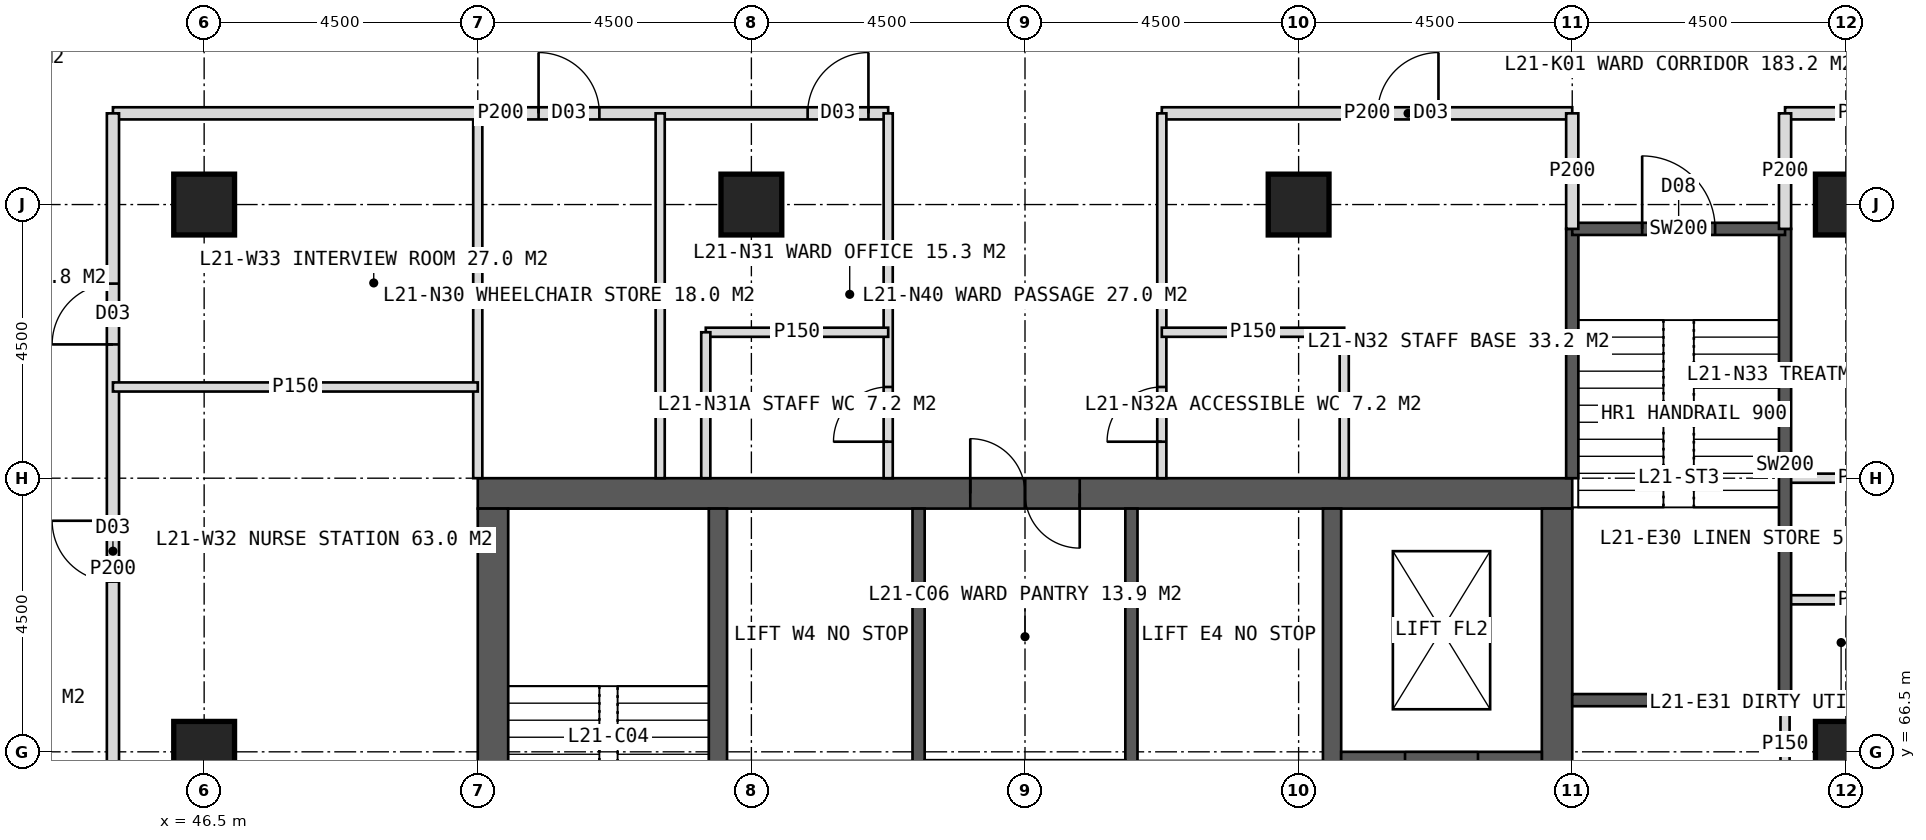
"""IFC4 building model, lengths in metres.
Left out: names, types, materials, properties, quantities, classifications, styles, units other than length and angle.
Written with IfcOpenShell. Run it as: python <this file> out.ifc"""

import sys

from ifc_helpers import new_model, si_unit, direction, frame, frame_2d, origin, origin_2d, place, context, subcontext, project, spatial, rectangle, hollow_rectangle, extrude, element, fill, save


model = new_model("IFC4")
c1 = context("Model", 3, precision=1e-05, world=origin(), true_north=direction((0.0, 1.0)))
c2 = subcontext(c1, "Body", "Model", "MODEL_VIEW")
j1 = project(units=[si_unit("LENGTHUNIT", "METRE"), si_unit("PLANEANGLEUNIT", "RADIAN")], contexts=[c1])
p1 = place(None, origin())
s1 = spatial("IfcSite", under=j1, at=p1, CompositionType="ELEMENT")
p2 = place(p1, origin())
s2 = spatial("IfcBuilding", under=s1, at=p2, CompositionType="ELEMENT")
p3 = place(p2, frame((0.0, 0.0, 91.0)))
s3 = spatial("IfcBuildingStorey", under=s2, at=p3, CompositionType="ELEMENT", Elevation=91.0)
p4 = place(p3, frame((51.0, 70.75, 0.0), z_axis=(0.0, 0.0, 1.0), x_axis=(1.0, 0.0, 0.0)))
e1 = element("IfcWall", 1, at=p4, inside=s3, PredefinedType="SHEAR", context=c2, shape_type="SweptSolid", body=[
    extrude(rectangle(XDim=18.0, YDim=0.5, at=frame_2d((9.0, 0.0))), origin(), (0.0, 0.0, 1.0), 4.0),
])
p5 = place(p4, frame((8.1, 0.0, 0.0)))
e2 = element("IfcOpeningElement", 2, at=p5, cuts=e1, PredefinedType="OPENING", context=c2, shape_type="SweptSolid", body=[
    extrude(rectangle(XDim=1.8, YDim=2.2, at=frame_2d((0.9, 1.1))), frame((0.0, 0.26, 0.0), z_axis=(0.0, -1.0, 0.0), x_axis=(1.0, 0.0, 0.0)), (0.0, 0.0, 1.0), 0.52),
])
p6 = place(p3, frame((51.25, 53.5, 0.0), z_axis=(0.0, 0.0, 1.0), x_axis=(0.0, 1.0, 0.0)))
e3 = element("IfcWall", 3, at=p6, inside=s3, PredefinedType="SHEAR", context=c2, shape_type="SweptSolid", body=[
    extrude(rectangle(XDim=17.0, YDim=0.5, at=frame_2d((8.5, 0.0))), origin(), (0.0, 0.0, 1.0), 4.0),
])
p7 = place(p6, frame((6.0, 0.0, 0.0)))
e4 = element("IfcOpeningElement", 4, at=p7, cuts=e3, PredefinedType="OPENING", context=c2, shape_type="SweptSolid", body=[
    extrude(rectangle(XDim=1.5, YDim=2.2, at=frame_2d((0.75, 1.1))), frame((0.0, 0.26, 0.0), z_axis=(0.0, -1.0, 0.0), x_axis=(1.0, 0.0, 0.0)), (0.0, 0.0, 1.0), 0.52),
])
p8 = place(p3, frame((68.75, 53.5, 0.0), z_axis=(0.0, 0.0, 1.0), x_axis=(0.0, 1.0, 0.0)))
e5 = element("IfcWall", 5, at=p8, inside=s3, PredefinedType="SHEAR", context=c2, shape_type="SweptSolid", body=[
    extrude(rectangle(XDim=17.0, YDim=0.5, at=frame_2d((8.5, 0.0))), origin(), (0.0, 0.0, 1.0), 4.0),
])
p9 = place(p8, frame((9.5, 0.0, 0.0)))
e6 = element("IfcOpeningElement", 6, at=p9, cuts=e5, PredefinedType="OPENING", context=c2, shape_type="SweptSolid", body=[
    extrude(rectangle(XDim=1.5, YDim=2.2, at=frame_2d((0.75, 1.1))), frame((0.0, 0.26, 0.0), z_axis=(0.0, -1.0, 0.0), x_axis=(1.0, 0.0, 0.0)), (0.0, 0.0, 1.0), 0.52),
])
for number, where, z_axis, x_axis in (
    (7, (54.95, 53.5, 0.0), (0.0, 0.0, 1.0), (0.0, 1.0, 0.0)),
    (8, (65.05, 53.5, 0.0), (0.0, 0.0, 1.0), (0.0, 1.0, 0.0)),
):
    element("IfcWall", number, at=place(p3, frame(where, z_axis=z_axis, x_axis=x_axis)), inside=s3, PredefinedType="SHEAR", context=c2, shape_type="SweptSolid", body=[
        extrude(rectangle(XDim=17.0, YDim=0.3, at=frame_2d((8.5, 0.0))), origin(), (0.0, 0.0, 1.0), 4.0),
    ])
p10 = place(p3, frame((58.25, 53.5, 0.0), z_axis=(0.0, 0.0, 1.0), x_axis=(0.0, 1.0, 0.0)))
e9 = element("IfcWall", 9, at=p10, inside=s3, PredefinedType="SHEAR", context=c2, shape_type="SweptSolid", body=[
    extrude(rectangle(XDim=17.0, YDim=0.2, at=frame_2d((8.5, 0.0))), origin(), (0.0, 0.0, 1.0), 4.0),
])
p11 = place(p10, frame((1.375, 0.0, 0.0)))
e10 = element("IfcOpeningElement", 10, at=p11, cuts=e9, PredefinedType="OPENING", context=c2, shape_type="SweptSolid", body=[
    extrude(rectangle(XDim=1.4, YDim=2.2, at=frame_2d((0.7, 1.1))), frame((0.0, 0.11, 0.0), z_axis=(0.0, -1.0, 0.0), x_axis=(1.0, 0.0, 0.0)), (0.0, 0.0, 1.0), 0.22),
])
p12 = place(p10, frame((5.675, 0.0, 0.0)))
e11 = element("IfcOpeningElement", 11, at=p12, cuts=e9, PredefinedType="OPENING", context=c2, shape_type="SweptSolid", body=[
    extrude(rectangle(XDim=1.4, YDim=2.2, at=frame_2d((0.7, 1.1))), frame((0.0, 0.11, 0.0), z_axis=(0.0, -1.0, 0.0), x_axis=(1.0, 0.0, 0.0)), (0.0, 0.0, 1.0), 0.22),
])
p13 = place(p3, frame((61.75, 53.5, 0.0), z_axis=(0.0, 0.0, 1.0), x_axis=(0.0, 1.0, 0.0)))
e12 = element("IfcWall", 12, at=p13, inside=s3, PredefinedType="SHEAR", context=c2, shape_type="SweptSolid", body=[
    extrude(rectangle(XDim=17.0, YDim=0.2, at=frame_2d((8.5, 0.0))), origin(), (0.0, 0.0, 1.0), 4.0),
])
p14 = place(p13, frame((1.375, 0.0, 0.0)))
e13 = element("IfcOpeningElement", 13, at=p14, cuts=e12, PredefinedType="OPENING", context=c2, shape_type="SweptSolid", body=[
    extrude(rectangle(XDim=1.4, YDim=2.2, at=frame_2d((0.7, 1.1))), frame((0.0, 0.11, 0.0), z_axis=(0.0, -1.0, 0.0), x_axis=(1.0, 0.0, 0.0)), (0.0, 0.0, 1.0), 0.22),
])
p15 = place(p13, frame((5.675, 0.0, 0.0)))
e14 = element("IfcOpeningElement", 14, at=p15, cuts=e12, PredefinedType="OPENING", context=c2, shape_type="SweptSolid", body=[
    extrude(rectangle(XDim=1.4, YDim=2.2, at=frame_2d((0.7, 1.1))), frame((0.0, 0.11, 0.0), z_axis=(0.0, -1.0, 0.0), x_axis=(1.0, 0.0, 0.0)), (0.0, 0.0, 1.0), 0.22),
])
p16 = place(p3, frame((65.2, 66.35, 0.0), z_axis=(0.0, 0.0, 1.0), x_axis=(1.0, 0.0, 0.0)))
e15 = element("IfcWall", 15, at=p16, inside=s3, PredefinedType="SHEAR", context=c2, shape_type="SweptSolid", body=[
    extrude(rectangle(XDim=3.3, YDim=0.3, at=frame_2d((1.65, 0.0))), origin(), (0.0, 0.0, 1.0), 4.0),
])
p17 = place(p16, frame((1.05, 0.0, 0.0)))
e16 = element("IfcOpeningElement", 16, at=p17, cuts=e15, PredefinedType="OPENING", context=c2, shape_type="SweptSolid", body=[
    extrude(rectangle(XDim=1.2, YDim=2.2, at=frame_2d((0.6, 1.1))), frame((0.0, 0.16, 0.0), z_axis=(0.0, -1.0, 0.0), x_axis=(1.0, 0.0, 0.0)), (0.0, 0.0, 1.0), 0.32),
])
for number, where, z_axis, x_axis in (
    (17, (73.5, 75.5, 0.0), (0.0, 0.0, 1.0), (1.0, 0.0, 0.0)),
    (18, (46.5, 75.5, 0.0), (0.0, 0.0, 1.0), (1.0, 0.0, 0.0)),
    (19, (55.5, 75.5, 0.0), (0.0, 0.0, 1.0), (1.0, 0.0, 0.0)),
    (20, (64.5, 75.5, 0.0), (0.0, 0.0, 1.0), (1.0, 0.0, 0.0)),
    (21, (46.5, 66.5, 0.0), (0.0, 0.0, 1.0), (1.0, 0.0, 0.0)),
    (22, (73.5, 66.5, 0.0), (0.0, 0.0, 1.0), (1.0, 0.0, 0.0)),
):
    element("IfcColumn", number, at=place(p3, frame(where, z_axis=z_axis, x_axis=x_axis)), inside=s3, PredefinedType="COLUMN", context=c2, shape_type="SweptSolid", body=[
        extrude(hollow_rectangle(XDim=1.0, YDim=1.0, WallThickness=0.1, at=origin_2d()), origin(), (0.0, 0.0, 1.0), 4.0),
    ])
p18 = place(p3, frame((51.0, 71.0, 0.0), z_axis=(0.0, 0.0, 1.0), x_axis=(0.0, 1.0, 0.0)))
e23 = element("IfcWall", 23, at=p18, inside=s3, PredefinedType="PARTITIONING", context=c2, shape_type="SweptSolid", body=[
    extrude(rectangle(XDim=6.0, YDim=0.15, at=frame_2d((3.0, 0.0))), origin(), (0.0, 0.0, 1.0), 3.75),
])
p19 = place(p3, frame((45.0, 77.0, 0.0), z_axis=(0.0, 0.0, 1.0), x_axis=(1.0, 0.0, 0.0)))
e24 = element("IfcWall", 24, at=p19, inside=s3, PredefinedType="PARTITIONING", context=c2, shape_type="SweptSolid", body=[
    extrude(rectangle(XDim=12.75, YDim=0.2, at=frame_2d((6.375, 0.0))), origin(), (0.0, 0.0, 1.0), 3.75),
])
p20 = place(p19, frame((7.0, 0.0, 0.0)))
e25 = element("IfcOpeningElement", 25, at=p20, cuts=e24, PredefinedType="OPENING", context=c2, shape_type="SweptSolid", body=[
    extrude(rectangle(XDim=1.0, YDim=2.1, at=frame_2d((0.5, 1.05))), frame((0.0, 0.11, 0.0), z_axis=(0.0, -1.0, 0.0), x_axis=(1.0, 0.0, 0.0)), (0.0, 0.0, 1.0), 0.22),
])
p21 = place(p19, frame((11.425, 0.0, 0.0)))
e26 = element("IfcOpeningElement", 26, at=p21, cuts=e24, PredefinedType="OPENING", context=c2, shape_type="SweptSolid", body=[
    extrude(rectangle(XDim=1.0, YDim=2.1, at=frame_2d((0.5, 1.05))), frame((0.0, 0.11, 0.0), z_axis=(0.0, -1.0, 0.0), x_axis=(1.0, 0.0, 0.0)), (0.0, 0.0, 1.0), 0.22),
])
p22 = place(p3, frame((62.25, 77.0, 0.0), z_axis=(0.0, 0.0, 1.0), x_axis=(1.0, 0.0, 0.0)))
e27 = element("IfcWall", 27, at=p22, inside=s3, PredefinedType="PARTITIONING", context=c2, shape_type="SweptSolid", body=[
    extrude(rectangle(XDim=6.75, YDim=0.2, at=frame_2d((3.375, 0.0))), origin(), (0.0, 0.0, 1.0), 3.75),
])
p23 = place(p22, frame((3.55, 0.0, 0.0)))
e28 = element("IfcOpeningElement", 28, at=p23, cuts=e27, PredefinedType="OPENING", context=c2, shape_type="SweptSolid", body=[
    extrude(rectangle(XDim=1.0, YDim=2.1, at=frame_2d((0.5, 1.05))), frame((0.0, 0.11, 0.0), z_axis=(0.0, -1.0, 0.0), x_axis=(1.0, 0.0, 0.0)), (0.0, 0.0, 1.0), 0.22),
])
p24 = place(p3, frame((72.5, 77.0, 0.0), z_axis=(0.0, 0.0, 1.0), x_axis=(1.0, 0.0, 0.0)))
e29 = element("IfcWall", 29, at=p24, inside=s3, PredefinedType="PARTITIONING", context=c2, shape_type="SweptSolid", body=[
    extrude(rectangle(XDim=2.5, YDim=0.2, at=frame_2d((1.25, 0.0))), origin(), (0.0, 0.0, 1.0), 3.75),
])
p25 = place(p3, frame((57.75, 71.0, 0.0), z_axis=(0.0, 0.0, 1.0), x_axis=(0.0, 1.0, 0.0)))
e30 = element("IfcWall", 30, at=p25, inside=s3, PredefinedType="PARTITIONING", context=c2, shape_type="SweptSolid", body=[
    extrude(rectangle(XDim=6.0, YDim=0.15, at=frame_2d((3.0, 0.0))), origin(), (0.0, 0.0, 1.0), 3.75),
])
p26 = place(p25, frame((0.6, 0.0, 0.0)))
e31 = element("IfcOpeningElement", 31, at=p26, cuts=e30, PredefinedType="OPENING", context=c2, shape_type="SweptSolid", body=[
    extrude(rectangle(XDim=0.9, YDim=2.1, at=frame_2d((0.45, 1.05))), frame((0.0, 0.085, 0.0), z_axis=(0.0, -1.0, 0.0), x_axis=(1.0, 0.0, 0.0)), (0.0, 0.0, 1.0), 0.17),
])
p27 = place(p3, frame((62.25, 71.0, 0.0), z_axis=(0.0, 0.0, 1.0), x_axis=(0.0, 1.0, 0.0)))
e32 = element("IfcWall", 32, at=p27, inside=s3, PredefinedType="PARTITIONING", context=c2, shape_type="SweptSolid", body=[
    extrude(rectangle(XDim=6.0, YDim=0.15, at=frame_2d((3.0, 0.0))), origin(), (0.0, 0.0, 1.0), 3.75),
])
p28 = place(p27, frame((0.6, 0.0, 0.0)))
e33 = element("IfcOpeningElement", 33, at=p28, cuts=e32, PredefinedType="OPENING", context=c2, shape_type="SweptSolid", body=[
    extrude(rectangle(XDim=0.9, YDim=2.1, at=frame_2d((0.45, 1.05))), frame((0.0, 0.085, 0.0), z_axis=(0.0, -1.0, 0.0), x_axis=(1.0, 0.0, 0.0)), (0.0, 0.0, 1.0), 0.17),
])
p29 = place(p3, frame((54.0, 71.0, 0.0), z_axis=(0.0, 0.0, 1.0), x_axis=(0.0, 1.0, 0.0)))
e34 = element("IfcWall", 34, at=p29, inside=s3, PredefinedType="PARTITIONING", context=c2, shape_type="SweptSolid", body=[
    extrude(rectangle(XDim=6.0, YDim=0.15, at=frame_2d((3.0, 0.0))), origin(), (0.0, 0.0, 1.0), 3.75),
])
p30 = place(p3, frame((54.75, 73.4, 0.0), z_axis=(0.0, 0.0, 1.0), x_axis=(1.0, 0.0, 0.0)))
e35 = element("IfcWall", 35, at=p30, inside=s3, PredefinedType="PARTITIONING", context=c2, shape_type="SweptSolid", body=[
    extrude(rectangle(XDim=3.0, YDim=0.15, at=frame_2d((1.5, 0.0))), origin(), (0.0, 0.0, 1.0), 3.75),
])
p31 = place(p3, frame((54.75, 71.0, 0.0), z_axis=(0.0, 0.0, 1.0), x_axis=(0.0, 1.0, 0.0)))
e36 = element("IfcWall", 36, at=p31, inside=s3, PredefinedType="PARTITIONING", context=c2, shape_type="SweptSolid", body=[
    extrude(rectangle(XDim=2.4, YDim=0.15, at=frame_2d((1.2, 0.0))), origin(), (0.0, 0.0, 1.0), 3.75),
])
p32 = place(p3, frame((62.25, 73.4, 0.0), z_axis=(0.0, 0.0, 1.0), x_axis=(1.0, 0.0, 0.0)))
e37 = element("IfcWall", 37, at=p32, inside=s3, PredefinedType="PARTITIONING", context=c2, shape_type="SweptSolid", body=[
    extrude(rectangle(XDim=3.0, YDim=0.15, at=frame_2d((1.5, 0.0))), origin(), (0.0, 0.0, 1.0), 3.75),
])
p33 = place(p3, frame((65.25, 71.0, 0.0), z_axis=(0.0, 0.0, 1.0), x_axis=(0.0, 1.0, 0.0)))
e38 = element("IfcWall", 38, at=p33, inside=s3, PredefinedType="PARTITIONING", context=c2, shape_type="SweptSolid", body=[
    extrude(rectangle(XDim=2.4, YDim=0.15, at=frame_2d((1.2, 0.0))), origin(), (0.0, 0.0, 1.0), 3.75),
])
p34 = place(p3, frame((45.0, 62.0, 0.0), z_axis=(0.0, 0.0, 1.0), x_axis=(0.0, 1.0, 0.0)))
e39 = element("IfcWall", 39, at=p34, inside=s3, PredefinedType="PARTITIONING", context=c2, shape_type="SweptSolid", body=[
    extrude(rectangle(XDim=15.0, YDim=0.2, at=frame_2d((7.5, 0.0))), origin(), (0.0, 0.0, 1.0), 3.75),
])
p35 = place(p34, frame((7.3, 0.0, 0.0)))
e40 = element("IfcOpeningElement", 40, at=p35, cuts=e39, PredefinedType="OPENING", context=c2, shape_type="SweptSolid", body=[
    extrude(rectangle(XDim=1.0, YDim=2.1, at=frame_2d((0.5, 1.05))), frame((0.0, 0.11, 0.0), z_axis=(0.0, -1.0, 0.0), x_axis=(1.0, 0.0, 0.0)), (0.0, 0.0, 1.0), 0.22),
])
p36 = place(p34, frame((11.2, 0.0, 0.0)))
e41 = element("IfcOpeningElement", 41, at=p36, cuts=e39, PredefinedType="OPENING", context=c2, shape_type="SweptSolid", body=[
    extrude(rectangle(XDim=1.0, YDim=2.1, at=frame_2d((0.5, 1.05))), frame((0.0, 0.11, 0.0), z_axis=(0.0, -1.0, 0.0), x_axis=(1.0, 0.0, 0.0)), (0.0, 0.0, 1.0), 0.22),
])
p37 = place(p3, frame((51.0, 72.5, 0.0), z_axis=(0.0, 0.0, 1.0), x_axis=(-1.0, 0.0, 0.0)))
e42 = element("IfcWall", 42, at=p37, inside=s3, PredefinedType="PARTITIONING", context=c2, shape_type="SweptSolid", body=[
    extrude(rectangle(XDim=6.0, YDim=0.15, at=frame_2d((3.0, 0.0))), origin(), (0.0, 0.0, 1.0), 3.75),
])
for number, where, z_axis, x_axis in (
    (43, (72.5, 71.0, 0.0), (0.0, 0.0, 1.0), (1.0, 0.0, 0.0)),
    (44, (72.5, 69.0, 0.0), (0.0, 0.0, 1.0), (1.0, 0.0, 0.0)),
):
    element("IfcWall", number, at=place(p3, frame(where, z_axis=z_axis, x_axis=x_axis)), inside=s3, PredefinedType="PARTITIONING", context=c2, shape_type="SweptSolid", body=[
        extrude(rectangle(XDim=2.5, YDim=0.15, at=frame_2d((1.25, 0.0))), origin(), (0.0, 0.0, 1.0), 3.75),
    ])
p38 = place(p3, frame((58.35, 66.288, 0.0), z_axis=(0.0, 0.0, 1.0), x_axis=(1.0, 0.0, 0.0)))
e45 = element("IfcWall", 45, at=p38, inside=s3, PredefinedType="PARTITIONING", context=c2, shape_type="SweptSolid", body=[
    extrude(rectangle(XDim=3.3, YDim=0.15, at=frame_2d((1.65, 0.0))), origin(), (0.0, 0.0, 1.0), 3.75),
])
p39 = place(p3, frame((72.5, 65.9, 0.0), z_axis=(0.0, 0.0, 1.0), x_axis=(0.0, 1.0, 0.0)))
e46 = element("IfcWall", 46, at=p39, inside=s3, PredefinedType="PARTITIONING", context=c2, shape_type="SweptSolid", body=[
    extrude(rectangle(XDim=1.45, YDim=0.15, at=frame_2d((0.725, 0.0))), origin(), (0.0, 0.0, 1.0), 3.75),
])
p40 = place(p3, frame((69.0, 71.0, 0.0), z_axis=(0.0, 0.0, 1.0), x_axis=(0.0, 1.0, 0.0)))
e47 = element("IfcWall", 47, at=p40, inside=s3, PredefinedType="SOLIDWALL", context=c2, shape_type="SweptSolid", body=[
    extrude(rectangle(XDim=4.1, YDim=0.2, at=frame_2d((2.05, 0.0))), origin(), (0.0, 0.0, 1.0), 3.75),
])
p41 = place(p3, frame((69.0, 67.35, 0.0), z_axis=(0.0, 0.0, 1.0), x_axis=(1.0, 0.0, 0.0)))
e48 = element("IfcWall", 48, at=p41, inside=s3, PredefinedType="SOLIDWALL", context=c2, shape_type="SweptSolid", body=[
    extrude(rectangle(XDim=3.5, YDim=0.2, at=frame_2d((1.75, 0.0))), origin(), (0.0, 0.0, 1.0), 3.75),
])
p42 = place(p3, frame((72.5, 67.35, 0.0), z_axis=(0.0, 0.0, 1.0), x_axis=(0.0, 1.0, 0.0)))
e49 = element("IfcWall", 49, at=p42, inside=s3, PredefinedType="SOLIDWALL", context=c2, shape_type="SweptSolid", body=[
    extrude(rectangle(XDim=7.75, YDim=0.2, at=frame_2d((3.875, 0.0))), origin(), (0.0, 0.0, 1.0), 3.75),
])
p43 = place(p3, frame((69.0, 75.1, 0.0), z_axis=(0.0, 0.0, 1.0), x_axis=(1.0, 0.0, 0.0)))
e50 = element("IfcWall", 50, at=p43, inside=s3, PredefinedType="SOLIDWALL", context=c2, shape_type="SweptSolid", body=[
    extrude(rectangle(XDim=3.5, YDim=0.2, at=frame_2d((1.75, 0.0))), origin(), (0.0, 0.0, 1.0), 3.75),
])
p44 = place(p43, frame((1.15, 0.0, 0.0)))
e51 = element("IfcOpeningElement", 51, at=p44, cuts=e50, PredefinedType="OPENING", context=c2, shape_type="SweptSolid", body=[
    extrude(rectangle(XDim=1.2, YDim=2.1, at=frame_2d((0.6, 1.05))), frame((0.0, 0.11, 0.0), z_axis=(0.0, -1.0, 0.0), x_axis=(1.0, 0.0, 0.0)), (0.0, 0.0, 1.0), 0.22),
])
for number, where, z_axis, x_axis in (
    (52, (69.0, 75.1, 0.0), (0.0, 0.0, 1.0), (0.0, 1.0, 0.0)),
    (53, (72.5, 75.1, 0.0), (0.0, 0.0, 1.0), (0.0, 1.0, 0.0)),
):
    element("IfcWall", number, at=place(p3, frame(where, z_axis=z_axis, x_axis=x_axis)), inside=s3, PredefinedType="PARTITIONING", context=c2, shape_type="SweptSolid", body=[
        extrude(rectangle(XDim=1.9, YDim=0.2, at=frame_2d((0.95, 0.0))), origin(), (0.0, 0.0, 1.0), 3.75),
    ])
p45 = place(p20, origin())
e54 = element("IfcDoor", 54, at=p45, inside=s3, OperationType="SINGLE_SWING_LEFT", PredefinedType="DOOR", context=c2, shape_type="SweptSolid", body=[
    extrude(rectangle(XDim=1.0, YDim=2.1, at=frame_2d((0.5, 1.05))), frame((0.0, 0.025, 0.0), z_axis=(0.0, -1.0, 0.0), x_axis=(1.0, 0.0, 0.0)), (0.0, 0.0, 1.0), 0.05),
])
fill(e25, e54)
p46 = place(p26, origin())
e55 = element("IfcDoor", 55, at=p46, inside=s3, OperationType="SINGLE_SWING_LEFT", PredefinedType="DOOR", context=c2, shape_type="SweptSolid", body=[
    extrude(rectangle(XDim=0.9, YDim=2.1, at=frame_2d((0.45, 1.05))), frame((0.0, 0.025, 0.0), z_axis=(0.0, -1.0, 0.0), x_axis=(1.0, 0.0, 0.0)), (0.0, 0.0, 1.0), 0.05),
])
fill(e31, e55)
p47 = place(p21, origin())
e56 = element("IfcDoor", 56, at=p47, inside=s3, OperationType="SINGLE_SWING_RIGHT", PredefinedType="DOOR", context=c2, shape_type="SweptSolid", body=[
    extrude(rectangle(XDim=1.0, YDim=2.1, at=frame_2d((0.5, 1.05))), frame((0.0, 0.025, 0.0), z_axis=(0.0, -1.0, 0.0), x_axis=(1.0, 0.0, 0.0)), (0.0, 0.0, 1.0), 0.05),
])
fill(e26, e56)
p48 = place(p28, origin())
e57 = element("IfcDoor", 57, at=p48, inside=s3, OperationType="SINGLE_SWING_LEFT", PredefinedType="DOOR", context=c2, shape_type="SweptSolid", body=[
    extrude(rectangle(XDim=0.9, YDim=2.1, at=frame_2d((0.45, 1.05))), frame((0.0, 0.025, 0.0), z_axis=(0.0, -1.0, 0.0), x_axis=(1.0, 0.0, 0.0)), (0.0, 0.0, 1.0), 0.05),
])
fill(e33, e57)
p49 = place(p23, origin())
e58 = element("IfcDoor", 58, at=p49, inside=s3, OperationType="SINGLE_SWING_RIGHT", PredefinedType="DOOR", context=c2, shape_type="SweptSolid", body=[
    extrude(rectangle(XDim=1.0, YDim=2.1, at=frame_2d((0.5, 1.05))), frame((0.0, 0.025, 0.0), z_axis=(0.0, -1.0, 0.0), x_axis=(1.0, 0.0, 0.0)), (0.0, 0.0, 1.0), 0.05),
])
fill(e28, e58)
p50 = place(p35, origin())
e59 = element("IfcDoor", 59, at=p50, inside=s3, OperationType="SINGLE_SWING_RIGHT", PredefinedType="DOOR", context=c2, shape_type="SweptSolid", body=[
    extrude(rectangle(XDim=1.0, YDim=2.1, at=frame_2d((0.5, 1.05))), frame((0.0, 0.025, 0.0), z_axis=(0.0, -1.0, 0.0), x_axis=(1.0, 0.0, 0.0)), (0.0, 0.0, 1.0), 0.05),
])
fill(e40, e59)
p51 = place(p36, origin())
e60 = element("IfcDoor", 60, at=p51, inside=s3, OperationType="SINGLE_SWING_LEFT", PredefinedType="DOOR", context=c2, shape_type="SweptSolid", body=[
    extrude(rectangle(XDim=1.0, YDim=2.1, at=frame_2d((0.5, 1.05))), frame((0.0, 0.025, 0.0), z_axis=(0.0, -1.0, 0.0), x_axis=(1.0, 0.0, 0.0)), (0.0, 0.0, 1.0), 0.05),
])
fill(e41, e60)
p52 = place(p17, origin())
e61 = element("IfcDoor", 61, at=p52, inside=s3, OperationType="SLIDING_TO_LEFT", PredefinedType="DOOR", context=c2, shape_type="SweptSolid", body=[
    extrude(rectangle(XDim=1.2, YDim=2.2, at=frame_2d((0.6, 1.1))), frame((0.0, 0.025, 0.0), z_axis=(0.0, -1.0, 0.0), x_axis=(1.0, 0.0, 0.0)), (0.0, 0.0, 1.0), 0.05),
])
fill(e16, e61)
p53 = place(p5, origin())
e62 = element("IfcDoor", 62, at=p53, inside=s3, OperationType="DOUBLE_DOOR_SINGLE_SWING", PredefinedType="DOOR", context=c2, shape_type="SweptSolid", body=[
    extrude(rectangle(XDim=1.8, YDim=2.2, at=frame_2d((0.9, 1.1))), frame((0.0, 0.025, 0.0), z_axis=(0.0, -1.0, 0.0), x_axis=(1.0, 0.0, 0.0)), (0.0, 0.0, 1.0), 0.05),
])
fill(e2, e62)
p54 = place(p44, origin())
e63 = element("IfcDoor", 63, at=p54, inside=s3, OperationType="SINGLE_SWING_LEFT", PredefinedType="DOOR", context=c2, shape_type="SweptSolid", body=[
    extrude(rectangle(XDim=1.2, YDim=2.1, at=frame_2d((0.6, 1.05))), frame((0.0, 0.025, 0.0), z_axis=(0.0, -1.0, 0.0), x_axis=(1.0, 0.0, 0.0)), (0.0, 0.0, 1.0), 0.05),
])
fill(e51, e63)
save(model, sys.argv[1])
